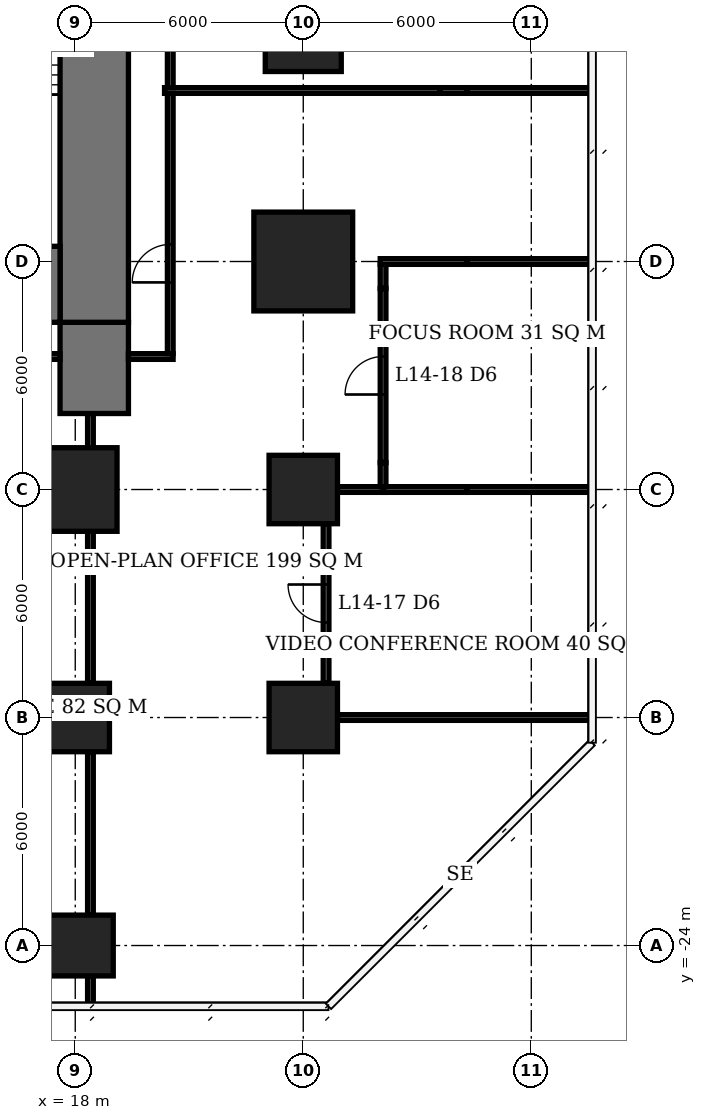
"""IFC4 building model, lengths in metres.
Left out: names, types, materials, properties, quantities, classifications, styles, units other than length and angle.
Written with IfcOpenShell. Run it as: python <this file> out.ifc"""

import sys

from ifc_helpers import new_model, si_unit, direction, frame, frame_2d, origin, origin_2d, place, context, subcontext, project, spatial, rectangle, extrude, element, fill, save


model = new_model("IFC4")
c1 = context("Model", 3, precision=1e-05, world=origin(), true_north=direction((0.0, 1.0)))
c2 = subcontext(c1, "Body", "Model", "MODEL_VIEW")
j1 = project(units=[si_unit("LENGTHUNIT", "METRE"), si_unit("PLANEANGLEUNIT", "RADIAN")], contexts=[c1])
p1 = place(None, origin())
s1 = spatial("IfcSite", under=j1, at=p1, CompositionType="ELEMENT")
p2 = place(p1, origin())
s2 = spatial("IfcBuilding", under=s1, at=p2, CompositionType="ELEMENT")
p3 = place(p2, frame((0.0, 0.0, 61.1)))
s3 = spatial("IfcBuildingStorey", under=s2, at=p3, CompositionType="ELEMENT", Elevation=61.1)
p4 = place(p3, frame((18.0, -24.0, 0.0), z_axis=(0.0, 0.0, 1.0), x_axis=(1.0, 0.0, 0.0)))
e1 = element("IfcColumn", 1, at=p4, inside=s3, PredefinedType="COLUMN", context=c2, shape_type="SweptSolid", body=[
    extrude(rectangle(XDim=2.0, YDim=1.6, at=origin_2d()), origin(), (0.0, 0.0, 1.0), 3.9),
])
p5 = place(p3, frame((18.0, -18.0, 0.0), z_axis=(0.0, 0.0, 1.0), x_axis=(1.0, 0.0, 0.0)))
e2 = element("IfcColumn", 2, at=p5, inside=s3, PredefinedType="COLUMN", context=c2, shape_type="SweptSolid", body=[
    extrude(rectangle(XDim=1.8, YDim=1.8, at=origin_2d()), origin(), (0.0, 0.0, 1.0), 3.9),
])
p6 = place(p3, frame((18.0, -12.0, 0.0), z_axis=(0.0, 0.0, 1.0), x_axis=(1.0, 0.0, 0.0)))
e3 = element("IfcColumn", 3, at=p6, inside=s3, PredefinedType="COLUMN", context=c2, shape_type="SweptSolid", body=[
    extrude(rectangle(XDim=2.2, YDim=2.2, at=origin_2d()), origin(), (0.0, 0.0, 1.0), 3.9),
])
for number, where, z_axis, x_axis in (
    (4, (24.0, -18.0, 0.0), (0.0, 0.0, 1.0), (1.0, 0.0, 0.0)),
    (5, (24.0, -12.0, 0.0), (0.0, 0.0, 1.0), (1.0, 0.0, 0.0)),
):
    element("IfcColumn", number, at=place(p3, frame(where, z_axis=z_axis, x_axis=x_axis)), inside=s3, PredefinedType="COLUMN", context=c2, shape_type="SweptSolid", body=[
        extrude(rectangle(XDim=1.8, YDim=1.8, at=origin_2d()), origin(), (0.0, 0.0, 1.0), 3.9),
    ])
p7 = place(p3, frame((24.0, -6.0, 0.0), z_axis=(0.0, 0.0, 1.0), x_axis=(1.0, 0.0, 0.0)))
e6 = element("IfcColumn", 6, at=p7, inside=s3, PredefinedType="COLUMN", context=c2, shape_type="SweptSolid", body=[
    extrude(rectangle(XDim=2.6, YDim=2.6, at=origin_2d()), origin(), (0.0, 0.0, 1.0), 3.9),
])
p8 = place(p3, frame((24.0, 0.0, 0.0), z_axis=(0.0, 0.0, 1.0), x_axis=(1.0, 0.0, 0.0)))
e7 = element("IfcColumn", 7, at=p8, inside=s3, PredefinedType="COLUMN", context=c2, shape_type="SweptSolid", body=[
    extrude(rectangle(XDim=2.0, YDim=2.0, at=origin_2d()), origin(), (0.0, 0.0, 1.0), 3.9),
])
p9 = place(p3, frame((-5.6, -6.6, 0.0), z_axis=(0.0, 0.0, 1.0), x_axis=(1.0, 0.0, 0.0)))
e8 = element("IfcWall", 8, at=p9, inside=s3, PredefinedType="SHEAR", context=c2, shape_type="SweptSolid", body=[
    extrude(rectangle(XDim=23.2, YDim=2.0, at=frame_2d((11.6, 0.0))), origin(), (0.0, 0.0, 1.0), 3.9),
])
p10 = place(p3, frame((18.5, -7.6, 0.0), z_axis=(0.0, 0.0, 1.0), x_axis=(0.0, 1.0, 0.0)))
e9 = element("IfcWall", 9, at=p10, inside=s3, PredefinedType="SHEAR", context=c2, shape_type="SweptSolid", body=[
    extrude(rectangle(XDim=21.2, YDim=1.8, at=frame_2d((10.6, 0.0))), origin(), (0.0, 0.0, 1.0), 3.9),
])
p11 = place(p10, frame((9.2, 0.0, 0.0)))
e10 = element("IfcOpeningElement", 10, at=p11, cuts=e9, PredefinedType="OPENING", context=c2, shape_type="SweptSolid", body=[
    extrude(rectangle(XDim=1.8, YDim=2.4, at=frame_2d((0.9, 1.2))), frame((0.0, 0.91, 0.0), z_axis=(0.0, -1.0, 0.0), x_axis=(1.0, 0.0, 0.0)), (0.0, 0.0, 1.0), 1.82),
])
p12 = place(p3, frame((18.5, -10.0, 0.0), z_axis=(0.0, 0.0, 1.0), x_axis=(0.0, 1.0, 0.0)))
e11 = element("IfcWall", 11, at=p12, inside=s3, PredefinedType="SHEAR", context=c2, shape_type="SweptSolid", body=[
    extrude(rectangle(XDim=2.4, YDim=1.8, at=frame_2d((1.2, 0.0))), origin(), (0.0, 0.0, 1.0), 3.9),
])
p13 = place(p3, frame((24.9, -18.0, 0.0), z_axis=(0.0, 0.0, 1.0), x_axis=(1.0, 0.0, 0.0)))
e12 = element("IfcWall", 12, at=p13, inside=s3, PredefinedType="PARTITIONING", context=c2, shape_type="SweptSolid", body=[
    extrude(rectangle(XDim=6.7, YDim=0.15, at=frame_2d((3.35, 0.0))), origin(), (0.0, 0.0, 1.0), 3.65),
])
p14 = place(p3, frame((24.9, -12.0, 0.0), z_axis=(0.0, 0.0, 1.0), x_axis=(1.0, 0.0, 0.0)))
e13 = element("IfcWall", 13, at=p14, inside=s3, PredefinedType="PARTITIONING", context=c2, shape_type="SweptSolid", body=[
    extrude(rectangle(XDim=1.275, YDim=0.15, at=frame_2d((0.638, 0.0))), origin(), (0.0, 0.0, 1.0), 2.65),
])
p15 = place(p3, frame((26.1, -12.0, 0.0), z_axis=(0.0, 0.0, 1.0), x_axis=(1.0, 0.0, 0.0)))
e14 = element("IfcWall", 14, at=p15, inside=s3, PredefinedType="PARTITIONING", context=c2, shape_type="SweptSolid", body=[
    extrude(rectangle(XDim=2.21, YDim=0.15, at=frame_2d((1.105, 0.0))), origin(), (0.0, 0.0, 1.0), 2.65),
])
p16 = place(p3, frame((28.31, -12.0, 0.0), z_axis=(0.0, 0.0, 1.0), x_axis=(1.0, 0.0, 0.0)))
e15 = element("IfcWall", 15, at=p16, inside=s3, PredefinedType="PARTITIONING", context=c2, shape_type="SweptSolid", body=[
    extrude(rectangle(XDim=3.29, YDim=0.15, at=frame_2d((1.645, 0.0))), origin(), (0.0, 0.0, 1.0), 3.65),
])
p17 = place(p3, frame((26.025, -6.0, 0.0), z_axis=(0.0, 0.0, 1.0), x_axis=(1.0, 0.0, 0.0)))
e16 = element("IfcWall", 16, at=p17, inside=s3, PredefinedType="PARTITIONING", context=c2, shape_type="SweptSolid", body=[
    extrude(rectangle(XDim=2.285, YDim=0.15, at=frame_2d((1.143, 0.0))), origin(), (0.0, 0.0, 1.0), 2.65),
])
p18 = place(p3, frame((28.31, -6.0, 0.0), z_axis=(0.0, 0.0, 1.0), x_axis=(1.0, 0.0, 0.0)))
e17 = element("IfcWall", 17, at=p18, inside=s3, PredefinedType="PARTITIONING", context=c2, shape_type="SweptSolid", body=[
    extrude(rectangle(XDim=3.29, YDim=0.15, at=frame_2d((1.645, 0.0))), origin(), (0.0, 0.0, 1.0), 3.65),
])
p19 = place(p3, frame((24.6, -17.1, 0.0), z_axis=(0.0, 0.0, 1.0), x_axis=(0.0, 1.0, 0.0)))
e18 = element("IfcWall", 18, at=p19, inside=s3, PredefinedType="PARTITIONING", context=c2, shape_type="SweptSolid", body=[
    extrude(rectangle(XDim=4.2, YDim=0.15, at=frame_2d((2.1, 0.0))), origin(), (0.0, 0.0, 1.0), 3.65),
])
p20 = place(p19, frame((1.6, 0.0, 0.0)))
e19 = element("IfcOpeningElement", 19, at=p20, cuts=e18, PredefinedType="OPENING", context=c2, shape_type="SweptSolid", body=[
    extrude(rectangle(XDim=1.0, YDim=2.1, at=frame_2d((0.5, 1.05))), frame((0.0, 0.085, 0.0), z_axis=(0.0, -1.0, 0.0), x_axis=(1.0, 0.0, 0.0)), (0.0, 0.0, 1.0), 0.17),
])
p21 = place(p3, frame((26.1, -11.925, 0.0), z_axis=(0.0, 0.0, 1.0), x_axis=(0.0, 1.0, 0.0)))
e20 = element("IfcWall", 20, at=p21, inside=s3, PredefinedType="PARTITIONING", context=c2, shape_type="SweptSolid", body=[
    extrude(rectangle(XDim=0.635, YDim=0.15, at=frame_2d((0.317, 0.0))), origin(), (0.0, 0.0, 1.0), 2.65),
])
p22 = place(p3, frame((26.1, -11.29, 0.0), z_axis=(0.0, 0.0, 1.0), x_axis=(0.0, 1.0, 0.0)))
e21 = element("IfcWall", 21, at=p22, inside=s3, PredefinedType="PARTITIONING", context=c2, shape_type="SweptSolid", body=[
    extrude(rectangle(XDim=4.58, YDim=0.15, at=frame_2d((2.29, 0.0))), origin(), (0.0, 0.0, 1.0), 3.65),
])
p23 = place(p22, frame((1.79, 0.0, 0.0)))
e22 = element("IfcOpeningElement", 22, at=p23, cuts=e21, PredefinedType="OPENING", context=c2, shape_type="SweptSolid", body=[
    extrude(rectangle(XDim=1.0, YDim=2.1, at=frame_2d((0.5, 1.05))), frame((0.0, 0.085, 0.0), z_axis=(0.0, -1.0, 0.0), x_axis=(1.0, 0.0, 0.0)), (0.0, 0.0, 1.0), 0.17),
])
p24 = place(p3, frame((26.1, -6.71, 0.0), z_axis=(0.0, 0.0, 1.0), x_axis=(0.0, 1.0, 0.0)))
e23 = element("IfcWall", 23, at=p24, inside=s3, PredefinedType="PARTITIONING", context=c2, shape_type="SweptSolid", body=[
    extrude(rectangle(XDim=0.635, YDim=0.15, at=frame_2d((0.317, 0.0))), origin(), (0.0, 0.0, 1.0), 2.65),
])
p25 = place(p3, frame((17.6, -8.5, 0.0), z_axis=(0.0, 0.0, 1.0), x_axis=(-1.0, 0.0, 0.0)))
e24 = element("IfcWall", 24, at=p25, inside=s3, PredefinedType="PARTITIONING", context=c2, shape_type="SweptSolid", body=[
    extrude(rectangle(XDim=4.025, YDim=0.15, at=frame_2d((2.013, 0.0))), origin(), (0.0, 0.0, 1.0), 3.65),
])
p26 = place(p25, frame((2.165, 0.0, 0.0)))
e25 = element("IfcOpeningElement", 25, at=p26, cuts=e24, PredefinedType="OPENING", context=c2, shape_type="SweptSolid", body=[
    extrude(rectangle(XDim=1.0, YDim=2.1, at=frame_2d((0.5, 1.05))), frame((0.0, 0.085, 0.0), z_axis=(0.0, -1.0, 0.0), x_axis=(1.0, 0.0, 0.0)), (0.0, 0.0, 1.0), 0.17),
])
p27 = place(p3, frame((18.4, -25.55, 0.0), z_axis=(0.0, 0.0, 1.0), x_axis=(0.0, 1.0, 0.0)))
e26 = element("IfcWall", 26, at=p27, inside=s3, PredefinedType="PARTITIONING", context=c2, shape_type="SweptSolid", body=[
    extrude(rectangle(XDim=0.75, YDim=0.15, at=frame_2d((0.375, 0.0))), origin(), (0.0, 0.0, 1.0), 3.65),
])
p28 = place(p3, frame((18.4, -23.2, 0.0), z_axis=(0.0, 0.0, 1.0), x_axis=(0.0, 1.0, 0.0)))
e27 = element("IfcWall", 27, at=p28, inside=s3, PredefinedType="PARTITIONING", context=c2, shape_type="SweptSolid", body=[
    extrude(rectangle(XDim=4.3, YDim=0.15, at=frame_2d((2.15, 0.0))), origin(), (0.0, 0.0, 1.0), 3.65),
])
p29 = place(p3, frame((18.4, -17.1, 0.0), z_axis=(0.0, 0.0, 1.0), x_axis=(0.0, 1.0, 0.0)))
e28 = element("IfcWall", 28, at=p29, inside=s3, PredefinedType="PARTITIONING", context=c2, shape_type="SweptSolid", body=[
    extrude(rectangle(XDim=4.0, YDim=0.15, at=frame_2d((2.0, 0.0))), origin(), (0.0, 0.0, 1.0), 3.65),
])
p30 = place(p3, frame((18.4, -10.9, 0.0), z_axis=(0.0, 0.0, 1.0), x_axis=(0.0, 1.0, 0.0)))
e29 = element("IfcWall", 29, at=p30, inside=s3, PredefinedType="PARTITIONING", context=c2, shape_type="SweptSolid", body=[
    extrude(rectangle(XDim=0.9, YDim=0.15, at=frame_2d((0.45, 0.0))), origin(), (0.0, 0.0, 1.0), 3.65),
])
p31 = place(p3, frame((19.4, -8.5, 0.0), z_axis=(0.0, 0.0, 1.0), x_axis=(1.0, 0.0, 0.0)))
e30 = element("IfcWall", 30, at=p31, inside=s3, PredefinedType="PARTITIONING", context=c2, shape_type="SweptSolid", body=[
    extrude(rectangle(XDim=1.175, YDim=0.15, at=frame_2d((0.587, 0.0))), origin(), (0.0, 0.0, 1.0), 3.65),
])
p32 = place(p3, frame((20.5, -8.425, 0.0), z_axis=(0.0, 0.0, 1.0), x_axis=(0.0, 1.0, 0.0)))
e31 = element("IfcWall", 31, at=p32, inside=s3, PredefinedType="PARTITIONING", context=c2, shape_type="SweptSolid", body=[
    extrude(rectangle(XDim=6.85, YDim=0.15, at=frame_2d((3.425, 0.0))), origin(), (0.0, 0.0, 1.0), 3.65),
])
p33 = place(p32, frame((1.875, 0.0, 0.0)))
e32 = element("IfcOpeningElement", 32, at=p33, cuts=e31, PredefinedType="OPENING", context=c2, shape_type="SweptSolid", body=[
    extrude(rectangle(XDim=1.0, YDim=2.1, at=frame_2d((0.5, 1.05))), frame((0.0, 0.085, 0.0), z_axis=(0.0, -1.0, 0.0), x_axis=(1.0, 0.0, 0.0)), (0.0, 0.0, 1.0), 0.17),
])
p34 = place(p3, frame((20.5, -1.425, 0.0), z_axis=(0.0, 0.0, 1.0), x_axis=(0.0, 1.0, 0.0)))
e33 = element("IfcWall", 33, at=p34, inside=s3, PredefinedType="PARTITIONING", context=c2, shape_type="SweptSolid", body=[
    extrude(rectangle(XDim=11.85, YDim=0.15, at=frame_2d((5.925, 0.0))), origin(), (0.0, 0.0, 1.0), 3.65),
])
p35 = place(p34, frame((7.225, 0.0, 0.0)))
e34 = element("IfcOpeningElement", 34, at=p35, cuts=e33, PredefinedType="OPENING", context=c2, shape_type="SweptSolid", body=[
    extrude(rectangle(XDim=1.0, YDim=2.1, at=frame_2d((0.5, 1.05))), frame((0.0, 0.085, 0.0), z_axis=(0.0, -1.0, 0.0), x_axis=(1.0, 0.0, 0.0)), (0.0, 0.0, 1.0), 0.17),
])
p36 = place(p3, frame((20.35, -1.5, 0.0), z_axis=(0.0, 0.0, 1.0), x_axis=(1.0, 0.0, 0.0)))
e35 = element("IfcWall", 35, at=p36, inside=s3, PredefinedType="PARTITIONING", context=c2, shape_type="SweptSolid", body=[
    extrude(rectangle(XDim=7.24, YDim=0.15, at=frame_2d((3.62, 0.0))), origin(), (0.0, 0.0, 1.0), 3.65),
])
p37 = place(p3, frame((27.59, -1.5, 0.0), z_axis=(0.0, 0.0, 1.0), x_axis=(1.0, 0.0, 0.0)))
e36 = element("IfcWall", 36, at=p37, inside=s3, PredefinedType="PARTITIONING", context=c2, shape_type="SweptSolid", body=[
    extrude(rectangle(XDim=0.72, YDim=0.15, at=frame_2d((0.36, 0.0))), origin(), (0.0, 0.0, 1.0), 2.65),
])
p38 = place(p3, frame((28.31, -1.5, 0.0), z_axis=(0.0, 0.0, 1.0), x_axis=(1.0, 0.0, 0.0)))
e37 = element("IfcWall", 37, at=p38, inside=s3, PredefinedType="PARTITIONING", context=c2, shape_type="SweptSolid", body=[
    extrude(rectangle(XDim=3.29, YDim=0.15, at=frame_2d((1.645, 0.0))), origin(), (0.0, 0.0, 1.0), 3.65),
])
p39 = place(p20, origin())
e38 = element("IfcDoor", 38, at=p39, inside=s3, OperationType="SINGLE_SWING_RIGHT", PredefinedType="DOOR", context=c2, shape_type="SweptSolid", body=[
    extrude(rectangle(XDim=1.0, YDim=2.1, at=frame_2d((0.5, 1.05))), frame((0.0, 0.025, 0.0), z_axis=(0.0, -1.0, 0.0), x_axis=(1.0, 0.0, 0.0)), (0.0, 0.0, 1.0), 0.05),
])
fill(e19, e38)
p40 = place(p23, origin())
e39 = element("IfcDoor", 39, at=p40, inside=s3, OperationType="SINGLE_SWING_LEFT", PredefinedType="DOOR", context=c2, shape_type="SweptSolid", body=[
    extrude(rectangle(XDim=1.0, YDim=2.1, at=frame_2d((0.5, 1.05))), frame((0.0, 0.025, 0.0), z_axis=(0.0, -1.0, 0.0), x_axis=(1.0, 0.0, 0.0)), (0.0, 0.0, 1.0), 0.05),
])
fill(e22, e39)
p41 = place(p33, origin())
e40 = element("IfcDoor", 40, at=p41, inside=s3, OperationType="SINGLE_SWING_LEFT", PredefinedType="DOOR", context=c2, shape_type="SweptSolid", body=[
    extrude(rectangle(XDim=1.0, YDim=2.1, at=frame_2d((0.5, 1.05))), frame((0.0, 0.025, 0.0), z_axis=(0.0, -1.0, 0.0), x_axis=(1.0, 0.0, 0.0)), (0.0, 0.0, 1.0), 0.05),
])
fill(e32, e40)
save(model, sys.argv[1])
